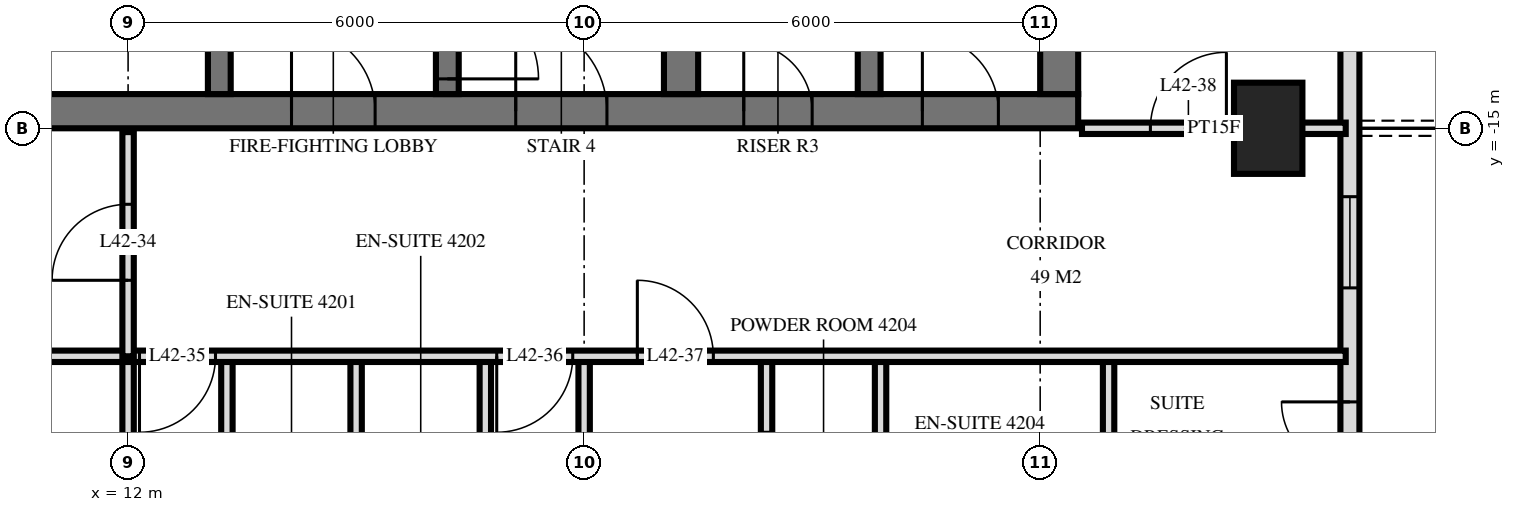
"""IFC4 building model, lengths in metres.
Left out: names, types, materials, properties, quantities, classifications, styles, units other than length and angle.
Written with IfcOpenShell. Run it as: python <this file> out.ifc"""

import sys

from ifc_helpers import new_model, si_unit, direction, frame, frame_2d, origin, origin_2d, place, context, subcontext, project, spatial, rectangle, extrude, element, fill, save


model = new_model("IFC4")
c1 = context("Model", 3, precision=1e-05, world=origin(), true_north=direction((0.0, 1.0)))
c2 = subcontext(c1, "Body", "Model", "MODEL_VIEW")
j1 = project(units=[si_unit("LENGTHUNIT", "METRE"), si_unit("PLANEANGLEUNIT", "RADIAN")], contexts=[c1])
p1 = place(None, origin())
s1 = spatial("IfcSite", under=j1, at=p1, CompositionType="ELEMENT")
p2 = place(p1, origin())
s2 = spatial("IfcBuilding", under=s1, at=p2, CompositionType="ELEMENT")
p3 = place(p2, frame((0.0, 0.0, 163.2)))
s3 = spatial("IfcBuildingStorey", under=s2, at=p3, CompositionType="ELEMENT", Elevation=163.2)
p4 = place(p3, frame((27.0, -15.0, 0.0), z_axis=(0.0, 0.0, 1.0), x_axis=(0.0, 1.0, 0.0)))
e1 = element("IfcColumn", 1, at=p4, inside=s3, PredefinedType="COLUMN", context=c2, shape_type="SweptSolid", body=[
    extrude(rectangle(XDim=1.2, YDim=0.9, at=origin_2d()), origin(), (0.0, 0.0, 1.0), 3.6),
])
p5 = place(p3, frame((10.0, -14.775, 0.0), z_axis=(0.0, 0.0, 1.0), x_axis=(1.0, 0.0, 0.0)))
e2 = element("IfcWall", 2, at=p5, inside=s3, PredefinedType="SHEAR", context=c2, shape_type="SweptSolid", body=[
    extrude(rectangle(XDim=14.5, YDim=0.45, at=frame_2d((7.25, 0.0))), origin(), (0.0, 0.0, 1.0), 3.6),
])
p6 = place(p5, frame((7.1, 0.0, 0.0)))
e3 = element("IfcOpeningElement", 3, at=p6, cuts=e2, PredefinedType="OPENING", context=c2, shape_type="SweptSolid", body=[
    extrude(rectangle(XDim=1.2, YDim=2.1, at=frame_2d((0.6, 1.05))), frame((0.0, 0.235, 0.0), z_axis=(0.0, -1.0, 0.0), x_axis=(1.0, 0.0, 0.0)), (0.0, 0.0, 1.0), 0.47),
])
p7 = place(p5, frame((4.15, 0.0, 0.0)))
e4 = element("IfcOpeningElement", 4, at=p7, cuts=e2, PredefinedType="OPENING", context=c2, shape_type="SweptSolid", body=[
    extrude(rectangle(XDim=1.1, YDim=2.1, at=frame_2d((0.55, 1.05))), frame((0.0, 0.235, 0.0), z_axis=(0.0, -1.0, 0.0), x_axis=(1.0, 0.0, 0.0)), (0.0, 0.0, 1.0), 0.47),
])
p8 = place(p5, frame((10.1, 0.0, 0.0)))
e5 = element("IfcOpeningElement", 5, at=p8, cuts=e2, PredefinedType="OPENING", context=c2, shape_type="SweptSolid", body=[
    extrude(rectangle(XDim=0.9, YDim=2.1, at=frame_2d((0.45, 1.05))), frame((0.0, 0.235, 0.0), z_axis=(0.0, -1.0, 0.0), x_axis=(1.0, 0.0, 0.0)), (0.0, 0.0, 1.0), 0.47),
])
p9 = place(p5, frame((12.45, 0.0, 0.0)))
e6 = element("IfcOpeningElement", 6, at=p9, cuts=e2, PredefinedType="OPENING", context=c2, shape_type="SweptSolid", body=[
    extrude(rectangle(XDim=1.0, YDim=2.1, at=frame_2d((0.5, 1.05))), frame((0.0, 0.235, 0.0), z_axis=(0.0, -1.0, 0.0), x_axis=(1.0, 0.0, 0.0)), (0.0, 0.0, 1.0), 0.47),
])
p10 = place(p3, frame((24.25, -14.55, 0.0), z_axis=(0.0, 0.0, 1.0), x_axis=(0.0, 1.0, 0.0)))
e7 = element("IfcWall", 7, at=p10, inside=s3, PredefinedType="SHEAR", context=c2, shape_type="SweptSolid", body=[
    extrude(rectangle(XDim=14.1, YDim=0.5, at=frame_2d((7.05, 0.0))), origin(), (0.0, 0.0, 1.0), 3.6),
])
p11 = place(p3, frame((13.2, -14.55, 0.0), z_axis=(0.0, 0.0, 1.0), x_axis=(0.0, 1.0, 0.0)))
e8 = element("IfcWall", 8, at=p11, inside=s3, PredefinedType="SHEAR", context=c2, shape_type="SweptSolid", body=[
    extrude(rectangle(XDim=5.4, YDim=0.3, at=frame_2d((2.7, 0.0))), origin(), (0.0, 0.0, 1.0), 3.6),
])
p12 = place(p11, frame((4.0, 0.0, 0.0)))
e9 = element("IfcOpeningElement", 9, at=p12, cuts=e8, PredefinedType="OPENING", context=c2, shape_type="SweptSolid", body=[
    extrude(rectangle(XDim=1.2, YDim=2.1, at=frame_2d((0.6, 1.05))), frame((0.0, 0.16, 0.0), z_axis=(0.0, -1.0, 0.0), x_axis=(1.0, 0.0, 0.0)), (0.0, 0.0, 1.0), 0.32),
])
p13 = place(p3, frame((16.2, -14.55, 0.0), z_axis=(0.0, 0.0, 1.0), x_axis=(0.0, 1.0, 0.0)))
e10 = element("IfcWall", 10, at=p13, inside=s3, PredefinedType="SHEAR", context=c2, shape_type="SweptSolid", body=[
    extrude(rectangle(XDim=5.4, YDim=0.3, at=frame_2d((2.7, 0.0))), origin(), (0.0, 0.0, 1.0), 3.6),
])
p14 = place(p13, frame((0.2, 0.0, 0.0)))
e11 = element("IfcOpeningElement", 11, at=p14, cuts=e10, PredefinedType="OPENING", context=c2, shape_type="SweptSolid", body=[
    extrude(rectangle(XDim=1.2, YDim=2.1, at=frame_2d((0.6, 1.05))), frame((0.0, 0.16, 0.0), z_axis=(0.0, -1.0, 0.0), x_axis=(1.0, 0.0, 0.0)), (0.0, 0.0, 1.0), 0.32),
])
p15 = place(p3, frame((19.275, -14.55, 0.0), z_axis=(0.0, 0.0, 1.0), x_axis=(0.0, 1.0, 0.0)))
e12 = element("IfcWall", 12, at=p15, inside=s3, PredefinedType="SHEAR", context=c2, shape_type="SweptSolid", body=[
    extrude(rectangle(XDim=5.4, YDim=0.45, at=frame_2d((2.7, 0.0))), origin(), (0.0, 0.0, 1.0), 3.6),
])
p16 = place(p3, frame((21.75, -14.55, 0.0), z_axis=(0.0, 0.0, 1.0), x_axis=(0.0, 1.0, 0.0)))
e13 = element("IfcWall", 13, at=p16, inside=s3, PredefinedType="SHEAR", context=c2, shape_type="SweptSolid", body=[
    extrude(rectangle(XDim=5.4, YDim=0.3, at=frame_2d((2.7, 0.0))), origin(), (0.0, 0.0, 1.0), 3.6),
])
p17 = place(p3, frame((28.075, -29.275, 0.0), z_axis=(0.0, 0.0, 1.0), x_axis=(0.0, 1.0, 0.0)))
e14 = element("IfcWall", 14, at=p17, inside=s3, PredefinedType="SOLIDWALL", context=c2, shape_type="SweptSolid", body=[
    extrude(rectangle(XDim=25.951, YDim=0.25, at=frame_2d((12.975, 0.0))), origin(), (0.0, 0.0, 1.0), 3.32),
])
p18 = place(p17, frame((0.575, 0.0, 0.0)))
e15 = element("IfcOpeningElement", 15, at=p18, cuts=e14, PredefinedType="OPENING", context=c2, shape_type="SweptSolid", body=[
    extrude(rectangle(XDim=1.8, YDim=2.4, at=frame_2d((0.9, 1.2))), frame((0.0, 0.135, 0.0), z_axis=(0.0, -1.0, 0.0), x_axis=(1.0, 0.0, 0.0)), (0.0, 0.0, 1.0), 0.27),
])
p19 = place(p17, frame((3.325, 0.0, 0.3)))
e16 = element("IfcOpeningElement", 16, at=p19, cuts=e14, PredefinedType="OPENING", context=c2, shape_type="SweptSolid", body=[
    extrude(rectangle(XDim=1.8, YDim=2.1, at=frame_2d((0.9, 1.05))), frame((0.0, 0.135, 0.0), z_axis=(0.0, -1.0, 0.0), x_axis=(1.0, 0.0, 0.0)), (0.0, 0.0, 1.0), 0.27),
])
p20 = place(p17, frame((8.875, 0.0, 0.0)))
e17 = element("IfcOpeningElement", 17, at=p20, cuts=e14, PredefinedType="OPENING", context=c2, shape_type="SweptSolid", body=[
    extrude(rectangle(XDim=1.8, YDim=2.4, at=frame_2d((0.9, 1.2))), frame((0.0, 0.135, 0.0), z_axis=(0.0, -1.0, 0.0), x_axis=(1.0, 0.0, 0.0)), (0.0, 0.0, 1.0), 0.27),
])
p21 = place(p17, frame((12.175, 0.0, 0.3)))
e18 = element("IfcOpeningElement", 18, at=p21, cuts=e14, PredefinedType="OPENING", context=c2, shape_type="SweptSolid", body=[
    extrude(rectangle(XDim=1.2, YDim=2.1, at=frame_2d((0.6, 1.05))), frame((0.0, 0.135, 0.0), z_axis=(0.0, -1.0, 0.0), x_axis=(1.0, 0.0, 0.0)), (0.0, 0.0, 1.0), 0.27),
])
p22 = place(p17, frame((17.5, 0.0, 0.0)))
e19 = element("IfcOpeningElement", 19, at=p22, cuts=e14, PredefinedType="OPENING", context=c2, shape_type="SweptSolid", body=[
    extrude(rectangle(XDim=1.8, YDim=2.4, at=frame_2d((0.9, 1.2))), frame((0.0, 0.135, 0.0), z_axis=(0.0, -1.0, 0.0), x_axis=(1.0, 0.0, 0.0)), (0.0, 0.0, 1.0), 0.27),
])
p23 = place(p3, frame((24.9, -21.0, 0.0), z_axis=(0.0, 0.0, 1.0), x_axis=(0.0, 1.0, 0.0)))
e20 = element("IfcWall", 20, at=p23, inside=s3, PredefinedType="PARTITIONING", context=c2, shape_type="SweptSolid", body=[
    extrude(rectangle(XDim=3.0, YDim=0.15, at=frame_2d((1.5, 0.0))), origin(), (0.0, 0.0, 1.0), 3.32),
])
p24 = place(p3, frame((21.9, -21.0, 0.0), z_axis=(0.0, 0.0, 1.0), x_axis=(0.0, 1.0, 0.0)))
e21 = element("IfcWall", 21, at=p24, inside=s3, PredefinedType="PLUMBINGWALL", context=c2, shape_type="SweptSolid", body=[
    extrude(rectangle(XDim=3.0, YDim=0.15, at=frame_2d((1.5, 0.0))), origin(), (0.0, 0.0, 1.0), 3.32),
])
p25 = place(p3, frame((20.4, -21.0, 0.0), z_axis=(0.0, 0.0, 1.0), x_axis=(0.0, 1.0, 0.0)))
e22 = element("IfcWall", 22, at=p25, inside=s3, PredefinedType="PARTITIONING", context=c2, shape_type="SweptSolid", body=[
    extrude(rectangle(XDim=3.0, YDim=0.15, at=frame_2d((1.5, 0.0))), origin(), (0.0, 0.0, 1.0), 3.32),
])
p26 = place(p25, frame((1.0, 0.0, 0.0)))
e23 = element("IfcOpeningElement", 23, at=p26, cuts=e22, PredefinedType="OPENING", context=c2, shape_type="SweptSolid", body=[
    extrude(rectangle(XDim=1.0, YDim=2.1, at=frame_2d((0.5, 1.05))), frame((0.0, 0.085, 0.0), z_axis=(0.0, -1.0, 0.0), x_axis=(1.0, 0.0, 0.0)), (0.0, 0.0, 1.0), 0.17),
])
p27 = place(p3, frame((18.0, -21.0, 0.0), z_axis=(0.0, 0.0, 1.0), x_axis=(0.0, 1.0, 0.0)))
e24 = element("IfcWall", 24, at=p27, inside=s3, PredefinedType="PARTITIONING", context=c2, shape_type="SweptSolid", body=[
    extrude(rectangle(XDim=3.0, YDim=0.15, at=frame_2d((1.5, 0.0))), origin(), (0.0, 0.0, 1.0), 3.32),
])
p28 = place(p3, frame((16.7, -21.8, 0.0), z_axis=(0.0, 0.0, 1.0), x_axis=(0.0, 1.0, 0.0)))
e25 = element("IfcWall", 25, at=p28, inside=s3, PredefinedType="PARTITIONING", context=c2, shape_type="SweptSolid", body=[
    extrude(rectangle(XDim=3.8, YDim=0.15, at=frame_2d((1.9, 0.0))), origin(), (0.0, 0.0, 1.0), 3.32),
])
p29 = place(p28, frame((1.5, 0.0, 0.0)))
e26 = element("IfcOpeningElement", 26, at=p29, cuts=e25, PredefinedType="OPENING", context=c2, shape_type="SweptSolid", body=[
    extrude(rectangle(XDim=0.8, YDim=2.1, at=frame_2d((0.4, 1.05))), frame((0.0, 0.085, 0.0), z_axis=(0.0, -1.0, 0.0), x_axis=(1.0, 0.0, 0.0)), (0.0, 0.0, 1.0), 0.17),
])
p30 = place(p3, frame((15.0, -33.62, 0.0), z_axis=(0.0, 0.0, 1.0), x_axis=(0.0, 1.0, 0.0)))
e27 = element("IfcWall", 27, at=p30, inside=s3, PredefinedType="PARTITIONING", context=c2, shape_type="SweptSolid", body=[
    extrude(rectangle(XDim=15.62, YDim=0.15, at=frame_2d((7.81, 0.0))), origin(), (0.0, 0.0, 1.0), 3.32),
])
p31 = place(p3, frame((13.3, -21.8, 0.0), z_axis=(0.0, 0.0, 1.0), x_axis=(0.0, 1.0, 0.0)))
e28 = element("IfcWall", 28, at=p31, inside=s3, PredefinedType="PARTITIONING", context=c2, shape_type="SweptSolid", body=[
    extrude(rectangle(XDim=3.8, YDim=0.15, at=frame_2d((1.9, 0.0))), origin(), (0.0, 0.0, 1.0), 3.32),
])
p32 = place(p31, frame((1.5, 0.0, 0.0)))
e29 = element("IfcOpeningElement", 29, at=p32, cuts=e28, PredefinedType="OPENING", context=c2, shape_type="SweptSolid", body=[
    extrude(rectangle(XDim=0.8, YDim=2.1, at=frame_2d((0.4, 1.05))), frame((0.0, 0.085, 0.0), z_axis=(0.0, -1.0, 0.0), x_axis=(1.0, 0.0, 0.0)), (0.0, 0.0, 1.0), 0.17),
])
p33 = place(p3, frame((12.0, -18.0, 0.0), z_axis=(0.0, 0.0, 1.0), x_axis=(0.0, 1.0, 0.0)))
e30 = element("IfcWall", 30, at=p33, inside=s3, PredefinedType="PARTITIONING", context=c2, shape_type="SweptSolid", body=[
    extrude(rectangle(XDim=2.95, YDim=0.15, at=frame_2d((1.475, 0.0))), origin(), (0.0, 0.0, 1.0), 3.32),
])
p34 = place(p33, frame((1.0, 0.0, 0.0)))
e31 = element("IfcOpeningElement", 31, at=p34, cuts=e30, PredefinedType="OPENING", context=c2, shape_type="SweptSolid", body=[
    extrude(rectangle(XDim=1.0, YDim=2.1, at=frame_2d((0.5, 1.05))), frame((0.0, 0.085, 0.0), z_axis=(0.0, -1.0, 0.0), x_axis=(1.0, 0.0, 0.0)), (0.0, 0.0, 1.0), 0.17),
])
p35 = place(p3, frame((12.0, -33.62, 0.0), z_axis=(0.0, 0.0, 1.0), x_axis=(0.0, 1.0, 0.0)))
e32 = element("IfcWall", 32, at=p35, inside=s3, PredefinedType="PARTITIONING", context=c2, shape_type="SweptSolid", body=[
    extrude(rectangle(XDim=15.62, YDim=0.15, at=frame_2d((7.81, 0.0))), origin(), (0.0, 0.0, 1.0), 3.32),
])
p36 = place(p3, frame((-28.02, -18.0, 0.0), z_axis=(0.0, 0.0, 1.0), x_axis=(1.0, 0.0, 0.0)))
e33 = element("IfcWall", 33, at=p36, inside=s3, PredefinedType="PARTITIONING", context=c2, shape_type="SweptSolid", body=[
    extrude(rectangle(XDim=56.04, YDim=0.15, at=frame_2d((28.02, 0.0))), origin(), (0.0, 0.0, 1.0), 3.32),
])
p37 = place(p36, frame((14.32, 0.0, 0.0)))
e34 = element("IfcOpeningElement", 34, at=p37, cuts=e33, PredefinedType="OPENING", context=c2, shape_type="SweptSolid", body=[
    extrude(rectangle(XDim=1.0, YDim=2.1, at=frame_2d((0.5, 1.05))), frame((0.0, 0.085, 0.0), z_axis=(0.0, -1.0, 0.0), x_axis=(1.0, 0.0, 0.0)), (0.0, 0.0, 1.0), 0.17),
])
p38 = place(p36, frame((40.17, 0.0, 0.0)))
e35 = element("IfcOpeningElement", 35, at=p38, cuts=e33, PredefinedType="OPENING", context=c2, shape_type="SweptSolid", body=[
    extrude(rectangle(XDim=1.0, YDim=2.1, at=frame_2d((0.5, 1.05))), frame((0.0, 0.085, 0.0), z_axis=(0.0, -1.0, 0.0), x_axis=(1.0, 0.0, 0.0)), (0.0, 0.0, 1.0), 0.17),
])
p39 = place(p36, frame((44.87, 0.0, 0.0)))
e36 = element("IfcOpeningElement", 36, at=p39, cuts=e33, PredefinedType="OPENING", context=c2, shape_type="SweptSolid", body=[
    extrude(rectangle(XDim=1.0, YDim=2.1, at=frame_2d((0.5, 1.05))), frame((0.0, 0.085, 0.0), z_axis=(0.0, -1.0, 0.0), x_axis=(1.0, 0.0, 0.0)), (0.0, 0.0, 1.0), 0.17),
])
p40 = place(p36, frame((46.72, 0.0, 0.0)))
e37 = element("IfcOpeningElement", 37, at=p40, cuts=e33, PredefinedType="OPENING", context=c2, shape_type="SweptSolid", body=[
    extrude(rectangle(XDim=1.0, YDim=2.1, at=frame_2d((0.5, 1.05))), frame((0.0, 0.085, 0.0), z_axis=(0.0, -1.0, 0.0), x_axis=(1.0, 0.0, 0.0)), (0.0, 0.0, 1.0), 0.17),
])
p41 = place(p36, frame((18.52, 0.0, 0.0)))
e38 = element("IfcOpeningElement", 38, at=p41, cuts=e33, PredefinedType="OPENING", context=c2, shape_type="SweptSolid", body=[
    extrude(rectangle(XDim=1.0, YDim=2.1, at=frame_2d((0.5, 1.05))), frame((0.0, 0.085, 0.0), z_axis=(0.0, -1.0, 0.0), x_axis=(1.0, 0.0, 0.0)), (0.0, 0.0, 1.0), 0.17),
])
p42 = place(p36, frame((24.52, 0.0, 0.0)))
e39 = element("IfcOpeningElement", 39, at=p42, cuts=e33, PredefinedType="OPENING", context=c2, shape_type="SweptSolid", body=[
    extrude(rectangle(XDim=1.0, YDim=2.1, at=frame_2d((0.5, 1.05))), frame((0.0, 0.085, 0.0), z_axis=(0.0, -1.0, 0.0), x_axis=(1.0, 0.0, 0.0)), (0.0, 0.0, 1.0), 0.17),
])
p43 = place(p36, frame((30.52, 0.0, 0.0)))
e40 = element("IfcOpeningElement", 40, at=p43, cuts=e33, PredefinedType="OPENING", context=c2, shape_type="SweptSolid", body=[
    extrude(rectangle(XDim=1.0, YDim=2.1, at=frame_2d((0.5, 1.05))), frame((0.0, 0.085, 0.0), z_axis=(0.0, -1.0, 0.0), x_axis=(1.0, 0.0, 0.0)), (0.0, 0.0, 1.0), 0.17),
])
p44 = place(p36, frame((36.52, 0.0, 0.0)))
e41 = element("IfcOpeningElement", 41, at=p44, cuts=e33, PredefinedType="OPENING", context=c2, shape_type="SweptSolid", body=[
    extrude(rectangle(XDim=1.0, YDim=2.1, at=frame_2d((0.5, 1.05))), frame((0.0, 0.085, 0.0), z_axis=(0.0, -1.0, 0.0), x_axis=(1.0, 0.0, 0.0)), (0.0, 0.0, 1.0), 0.17),
])
p45 = place(p3, frame((24.55, -15.0, 0.0), z_axis=(0.0, 0.0, 1.0), x_axis=(1.0, 0.0, 0.0)))
e42 = element("IfcWall", 42, at=p45, inside=s3, PredefinedType="PARTITIONING", context=c2, shape_type="SweptSolid", body=[
    extrude(rectangle(XDim=3.47, YDim=0.15, at=frame_2d((1.735, 0.0))), origin(), (0.0, 0.0, 1.0), 3.32),
])
p46 = place(p45, frame((0.9, 0.0, 0.0)))
e43 = element("IfcOpeningElement", 43, at=p46, cuts=e42, PredefinedType="OPENING", context=c2, shape_type="SweptSolid", body=[
    extrude(rectangle(XDim=1.0, YDim=2.1, at=frame_2d((0.5, 1.05))), frame((0.0, 0.085, 0.0), z_axis=(0.0, -1.0, 0.0), x_axis=(1.0, 0.0, 0.0)), (0.0, 0.0, 1.0), 0.17),
])
p47 = place(p20, origin())
e44 = element("IfcDoor", 44, at=p47, inside=s3, OperationType="DOUBLE_DOOR_SINGLE_SWING", PredefinedType="DOOR", context=c2, shape_type="SweptSolid", body=[
    extrude(rectangle(XDim=1.8, YDim=2.4, at=frame_2d((0.9, 1.2))), frame((0.0, 0.025, 0.0), z_axis=(0.0, -1.0, 0.0), x_axis=(1.0, 0.0, 0.0)), (0.0, 0.0, 1.0), 0.05),
])
fill(e17, e44)
p48 = place(p21, origin())
e45 = element("IfcWindow", 45, at=p48, inside=s3, PartitioningType="SINGLE_PANEL", PredefinedType="WINDOW", context=c2, shape_type="SweptSolid", body=[
    extrude(rectangle(XDim=1.2, YDim=2.1, at=frame_2d((0.6, 1.05))), frame((0.0, 0.03, 0.0), z_axis=(0.0, -1.0, 0.0), x_axis=(1.0, 0.0, 0.0)), (0.0, 0.0, 1.0), 0.06),
])
fill(e18, e45)
p49 = place(p6, origin())
e46 = element("IfcDoor", 46, at=p49, inside=s3, OperationType="SINGLE_SWING_RIGHT", PredefinedType="DOOR", context=c2, shape_type="SweptSolid", body=[
    extrude(rectangle(XDim=1.2, YDim=2.1, at=frame_2d((0.6, 1.05))), frame((0.0, 0.025, 0.0), z_axis=(0.0, -1.0, 0.0), x_axis=(1.0, 0.0, 0.0)), (0.0, 0.0, 1.0), 0.05),
])
fill(e3, e46)
p50 = place(p7, origin())
e47 = element("IfcDoor", 47, at=p50, inside=s3, OperationType="SINGLE_SWING_RIGHT", PredefinedType="DOOR", context=c2, shape_type="SweptSolid", body=[
    extrude(rectangle(XDim=1.1, YDim=2.1, at=frame_2d((0.55, 1.05))), frame((0.0, 0.025, 0.0), z_axis=(0.0, -1.0, 0.0), x_axis=(1.0, 0.0, 0.0)), (0.0, 0.0, 1.0), 0.05),
])
fill(e4, e47)
p51 = place(p8, origin())
e48 = element("IfcDoor", 48, at=p51, inside=s3, OperationType="SINGLE_SWING_RIGHT", PredefinedType="DOOR", context=c2, shape_type="SweptSolid", body=[
    extrude(rectangle(XDim=0.9, YDim=2.1, at=frame_2d((0.45, 1.05))), frame((0.0, 0.025, 0.0), z_axis=(0.0, -1.0, 0.0), x_axis=(1.0, 0.0, 0.0)), (0.0, 0.0, 1.0), 0.05),
])
fill(e5, e48)
p52 = place(p9, origin())
e49 = element("IfcDoor", 49, at=p52, inside=s3, OperationType="SINGLE_SWING_RIGHT", PredefinedType="DOOR", context=c2, shape_type="SweptSolid", body=[
    extrude(rectangle(XDim=1.0, YDim=2.1, at=frame_2d((0.5, 1.05))), frame((0.0, 0.025, 0.0), z_axis=(0.0, -1.0, 0.0), x_axis=(1.0, 0.0, 0.0)), (0.0, 0.0, 1.0), 0.05),
])
fill(e6, e49)
p53 = place(p14, frame((0.6, 0.0, 0.0), z_axis=(0.0, 0.0, 1.0), x_axis=(-1.0, 0.0, 0.0)))
e50 = element("IfcDoor", 50, at=p53, inside=s3, OperationType="SINGLE_SWING_LEFT", PredefinedType="DOOR", context=c2, shape_type="SweptSolid", body=[
    extrude(rectangle(XDim=1.2, YDim=2.1, at=frame_2d((0.0, 1.05))), frame((0.0, -0.025, 0.0), z_axis=(0.0, 1.0, 0.0), x_axis=(-1.0, 0.0, 0.0)), (0.0, 0.0, 1.0), 0.05),
])
fill(e11, e50)
p54 = place(p34, origin())
e51 = element("IfcDoor", 51, at=p54, inside=s3, OperationType="SINGLE_SWING_RIGHT", PredefinedType="DOOR", context=c2, shape_type="SweptSolid", body=[
    extrude(rectangle(XDim=1.0, YDim=2.1, at=frame_2d((0.5, 1.05))), frame((0.0, 0.025, 0.0), z_axis=(0.0, -1.0, 0.0), x_axis=(1.0, 0.0, 0.0)), (0.0, 0.0, 1.0), 0.05),
])
fill(e31, e51)
p55 = place(p38, frame((0.5, 0.0, 0.0), z_axis=(0.0, 0.0, 1.0), x_axis=(-1.0, 0.0, 0.0)))
e52 = element("IfcDoor", 52, at=p55, inside=s3, OperationType="SINGLE_SWING_LEFT", PredefinedType="DOOR", context=c2, shape_type="SweptSolid", body=[
    extrude(rectangle(XDim=1.0, YDim=2.1, at=frame_2d((0.0, 1.05))), frame((0.0, -0.025, 0.0), z_axis=(0.0, 1.0, 0.0), x_axis=(-1.0, 0.0, 0.0)), (0.0, 0.0, 1.0), 0.05),
])
fill(e35, e52)
p56 = place(p39, frame((0.5, 0.0, 0.0), z_axis=(0.0, 0.0, 1.0), x_axis=(-1.0, 0.0, 0.0)))
e53 = element("IfcDoor", 53, at=p56, inside=s3, OperationType="SINGLE_SWING_LEFT", PredefinedType="DOOR", context=c2, shape_type="SweptSolid", body=[
    extrude(rectangle(XDim=1.0, YDim=2.1, at=frame_2d((0.0, 1.05))), frame((0.0, -0.025, 0.0), z_axis=(0.0, 1.0, 0.0), x_axis=(-1.0, 0.0, 0.0)), (0.0, 0.0, 1.0), 0.05),
])
fill(e36, e53)
p57 = place(p40, origin())
e54 = element("IfcDoor", 54, at=p57, inside=s3, OperationType="SINGLE_SWING_RIGHT", PredefinedType="DOOR", context=c2, shape_type="SweptSolid", body=[
    extrude(rectangle(XDim=1.0, YDim=2.1, at=frame_2d((0.5, 1.05))), frame((0.0, 0.025, 0.0), z_axis=(0.0, -1.0, 0.0), x_axis=(1.0, 0.0, 0.0)), (0.0, 0.0, 1.0), 0.05),
])
fill(e37, e54)
p58 = place(p46, origin())
e55 = element("IfcDoor", 55, at=p58, inside=s3, OperationType="SINGLE_SWING_LEFT", PredefinedType="DOOR", context=c2, shape_type="SweptSolid", body=[
    extrude(rectangle(XDim=1.0, YDim=2.1, at=frame_2d((0.5, 1.05))), frame((0.0, 0.025, 0.0), z_axis=(0.0, -1.0, 0.0), x_axis=(1.0, 0.0, 0.0)), (0.0, 0.0, 1.0), 0.05),
])
fill(e43, e55)
save(model, sys.argv[1])
